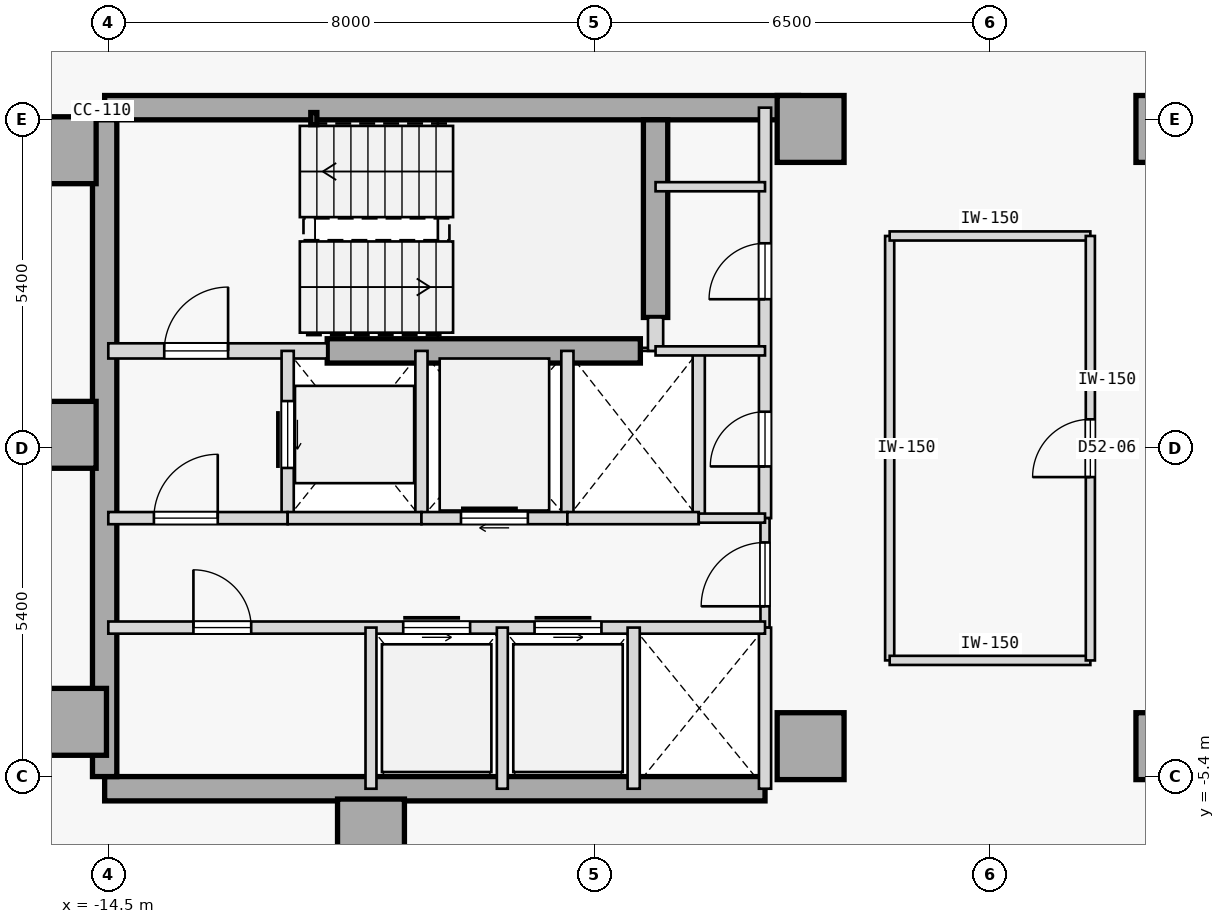
"""IFC4 building model, lengths in metres.
Left out: names, types, materials, properties, quantities, classifications, styles, units other than length and angle.
Written with IfcOpenShell. Run it as: python <this file> out.ifc"""

import sys

from ifc_helpers import new_model, si_unit, direction, frame, frame_2d, origin, origin_2d, place, context, subcontext, project, spatial, rectangle, hollow_rectangle, extrude, element, fill, save


model = new_model("IFC4")
c1 = context("Model", 3, precision=1e-05, world=origin(), true_north=direction((0.0, 1.0)))
c2 = subcontext(c1, "Body", "Model", "MODEL_VIEW")
j1 = project(units=[si_unit("LENGTHUNIT", "METRE"), si_unit("PLANEANGLEUNIT", "RADIAN")], contexts=[c1])
p1 = place(None, origin())
s1 = spatial("IfcSite", under=j1, at=p1, CompositionType="ELEMENT")
p2 = place(p1, origin())
s2 = spatial("IfcBuilding", under=s1, at=p2, CompositionType="ELEMENT")
p3 = place(p2, frame((0.0, 0.0, 199.0)))
s3 = spatial("IfcBuildingStorey", under=s2, at=p3, CompositionType="ELEMENT", Elevation=199.0)
for number, where, z_axis, x_axis in (
    (1, (-15.25, 4.9, 0.0), (0.0, 0.0, 1.0), (1.0, 0.0, 0.0)),
    (2, (-15.25, 0.22, 0.0), (0.0, 0.0, 1.0), (1.0, 0.0, 0.0)),
    (3, (-15.08, -4.5, 0.0), (0.0, 0.0, 1.0), (1.0, 0.0, 0.0)),
    (4, (-10.18, -6.32, 0.0), (0.0, 0.0, 1.0), (1.0, 0.0, 0.0)),
    (5, (-2.95, -4.9, 0.0), (0.0, 0.0, 1.0), (1.0, 0.0, 0.0)),
    (6, (-2.95, 5.25, 0.0), (0.0, 0.0, 1.0), (1.0, 0.0, 0.0)),
    (7, (2.95, -4.9, 0.0), (0.0, 0.0, 1.0), (1.0, 0.0, 0.0)),
    (8, (2.95, 5.25, 0.0), (0.0, 0.0, 1.0), (1.0, 0.0, 0.0)),
):
    element("IfcColumn", number, at=place(p3, frame(where, z_axis=z_axis, x_axis=x_axis)), inside=s3, PredefinedType="COLUMN", context=c2, shape_type="SweptSolid", body=[
        extrude(rectangle(XDim=1.1, YDim=1.1, at=origin_2d()), origin(), (0.0, 0.0, 1.0), 3.4),
    ])
p4 = place(p3, frame((-14.56, 5.6, 0.0), z_axis=(0.0, 0.0, 1.0), x_axis=(1.0, 0.0, 0.0)))
e9 = element("IfcWall", 9, at=p4, inside=s3, PredefinedType="SHEAR", context=c2, shape_type="SweptSolid", body=[
    extrude(rectangle(XDim=11.41, YDim=0.4, at=frame_2d((5.705, 0.0))), origin(), (0.0, 0.0, 1.0), 3.0),
])
p5 = place(p3, frame((-14.56, -5.6, 0.0), z_axis=(0.0, 0.0, 1.0), x_axis=(1.0, 0.0, 0.0)))
e10 = element("IfcWall", 10, at=p5, inside=s3, PredefinedType="SHEAR", context=c2, shape_type="SweptSolid", body=[
    extrude(rectangle(XDim=10.86, YDim=0.4, at=frame_2d((5.43, 0.0))), origin(), (0.0, 0.0, 1.0), 3.0),
])
p6 = place(p3, frame((-14.56, -5.4, 0.0), z_axis=(0.0, 0.0, 1.0), x_axis=(0.0, 1.0, 0.0)))
e11 = element("IfcWall", 11, at=p6, inside=s3, PredefinedType="SHEAR", context=c2, shape_type="SweptSolid", body=[
    extrude(rectangle(XDim=10.8, YDim=0.4, at=frame_2d((5.4, 0.0))), origin(), (0.0, 0.0, 1.0), 3.0),
])
p7 = place(p3, frame((-5.5, 2.15, 0.0), z_axis=(0.0, 0.0, 1.0), x_axis=(0.0, 1.0, 0.0)))
e12 = element("IfcWall", 12, at=p7, inside=s3, PredefinedType="SHEAR", context=c2, shape_type="SweptSolid", body=[
    extrude(rectangle(XDim=3.25, YDim=0.4, at=frame_2d((1.625, 0.0))), origin(), (0.0, 0.0, 1.0), 3.0),
])
p8 = place(p3, frame((-10.9, 1.6, 0.0), z_axis=(0.0, 0.0, 1.0), x_axis=(1.0, 0.0, 0.0)))
e13 = element("IfcWall", 13, at=p8, inside=s3, PredefinedType="SHEAR", context=c2, shape_type="SweptSolid", body=[
    extrude(rectangle(XDim=5.15, YDim=0.4, at=frame_2d((2.575, 0.0))), origin(), (0.0, 0.0, 1.0), 3.0),
])
p9 = place(p3, frame((-11.12, 5.42, 0.0), z_axis=(0.0, 0.0, 1.0), x_axis=(1.0, 0.0, 0.0)))
e14 = element("IfcColumn", 14, at=p9, inside=s3, PredefinedType="COLUMN", context=c2, shape_type="SweptSolid", body=[
    extrude(hollow_rectangle(XDim=0.1, YDim=0.2, WallThickness=0.008, at=origin_2d()), origin(), (0.0, 0.0, 1.0), 3.4),
])
p10 = place(p3, frame((-14.5, 1.6, 0.0), z_axis=(0.0, 0.0, 1.0), x_axis=(1.0, 0.0, 0.0)))
e15 = element("IfcWall", 15, at=p10, inside=s3, PredefinedType="STANDARD", context=c2, shape_type="SweptSolid", body=[
    extrude(rectangle(XDim=3.6, YDim=0.25, at=frame_2d((1.8, 0.0))), origin(), (0.0, 0.0, 1.0), 3.0),
])
p11 = place(p10, frame((0.92, 0.0, 0.0)))
e16 = element("IfcOpeningElement", 16, at=p11, cuts=e15, PredefinedType="OPENING", context=c2, shape_type="SweptSolid", body=[
    extrude(rectangle(XDim=1.05, YDim=2.15, at=frame_2d((0.525, 1.075))), frame((0.0, 0.135, 0.0), z_axis=(0.0, -1.0, 0.0), x_axis=(1.0, 0.0, 0.0)), (0.0, 0.0, 1.0), 0.27),
])
p12 = place(p3, frame((-5.5, 1.6, 0.0), z_axis=(0.0, 0.0, 1.0), x_axis=(0.0, 1.0, 0.0)))
e17 = element("IfcWall", 17, at=p12, inside=s3, PredefinedType="STANDARD", context=c2, shape_type="SweptSolid", body=[
    extrude(rectangle(XDim=0.55, YDim=0.25, at=frame_2d((0.275, 0.0))), origin(), (0.0, 0.0, 1.0), 3.0),
])
p13 = place(p3, frame((-3.7, -1.15, 0.0), z_axis=(0.0, 0.0, 1.0), x_axis=(0.0, 1.0, 0.0)))
e18 = element("IfcWall", 18, at=p13, inside=s3, PredefinedType="STANDARD", context=c2, shape_type="SweptSolid", body=[
    extrude(rectangle(XDim=6.75, YDim=0.2, at=frame_2d((3.375, 0.0))), origin(), (0.0, 0.0, 1.0), 3.0),
])
p14 = place(p13, frame((3.6, 0.0, 0.0)))
e19 = element("IfcOpeningElement", 19, at=p14, cuts=e18, PredefinedType="OPENING", context=c2, shape_type="SweptSolid", body=[
    extrude(rectangle(XDim=0.92, YDim=2.15, at=frame_2d((0.46, 1.075))), frame((0.0, 0.11, 0.0), z_axis=(0.0, -1.0, 0.0), x_axis=(1.0, 0.0, 0.0)), (0.0, 0.0, 1.0), 0.22),
])
p15 = place(p13, frame((0.85, 0.0, 0.0)))
e20 = element("IfcOpeningElement", 20, at=p15, cuts=e18, PredefinedType="OPENING", context=c2, shape_type="SweptSolid", body=[
    extrude(rectangle(XDim=0.9, YDim=2.15, at=frame_2d((0.45, 1.075))), frame((0.0, 0.11, 0.0), z_axis=(0.0, -1.0, 0.0), x_axis=(1.0, 0.0, 0.0)), (0.0, 0.0, 1.0), 0.22),
])
p16 = place(p3, frame((-3.7, -2.95, 0.0), z_axis=(0.0, 0.0, 1.0), x_axis=(0.0, 1.0, 0.0)))
e21 = element("IfcWall", 21, at=p16, inside=s3, PredefinedType="PARTITIONING", context=c2, shape_type="SweptSolid", body=[
    extrude(rectangle(XDim=1.8, YDim=0.15, at=frame_2d((0.9, 0.0))), origin(), (0.0, 0.0, 1.0), 3.0),
])
p17 = place(p16, frame((0.35, 0.0, 0.0)))
e22 = element("IfcOpeningElement", 22, at=p17, cuts=e21, PredefinedType="OPENING", context=c2, shape_type="SweptSolid", body=[
    extrude(rectangle(XDim=1.05, YDim=2.18, at=frame_2d((0.525, 1.09))), frame((0.0, 0.085, 0.0), z_axis=(0.0, -1.0, 0.0), x_axis=(1.0, 0.0, 0.0)), (0.0, 0.0, 1.0), 0.17),
])
p18 = place(p3, frame((-3.7, -5.6, 0.0), z_axis=(0.0, 0.0, 1.0), x_axis=(0.0, 1.0, 0.0)))
e23 = element("IfcWall", 23, at=p18, inside=s3, PredefinedType="STANDARD", context=c2, shape_type="SweptSolid", body=[
    extrude(rectangle(XDim=2.65, YDim=0.2, at=frame_2d((1.325, 0.0))), origin(), (0.0, 0.0, 1.0), 3.0),
])
p19 = place(p3, frame((-11.55, -1.15, 0.0), z_axis=(0.0, 0.0, 1.0), x_axis=(0.0, 1.0, 0.0)))
e24 = element("IfcWall", 24, at=p19, inside=s3, PredefinedType="STANDARD", context=c2, shape_type="SweptSolid", body=[
    extrude(rectangle(XDim=2.75, YDim=0.2, at=frame_2d((1.375, 0.0))), origin(), (0.0, 0.0, 1.0), 3.0),
])
p20 = place(p19, frame((0.825, 0.0, 0.0)))
e25 = element("IfcOpeningElement", 25, at=p20, cuts=e24, PredefinedType="OPENING", context=c2, shape_type="SweptSolid", body=[
    extrude(rectangle(XDim=1.1, YDim=2.15, at=frame_2d((0.55, 1.075))), frame((0.0, 0.11, 0.0), z_axis=(0.0, -1.0, 0.0), x_axis=(1.0, 0.0, 0.0)), (0.0, 0.0, 1.0), 0.22),
])
p21 = place(p3, frame((-9.35, -1.15, 0.0), z_axis=(0.0, 0.0, 1.0), x_axis=(0.0, 1.0, 0.0)))
e26 = element("IfcWall", 26, at=p21, inside=s3, PredefinedType="STANDARD", context=c2, shape_type="SweptSolid", body=[
    extrude(rectangle(XDim=2.75, YDim=0.2, at=frame_2d((1.375, 0.0))), origin(), (0.0, 0.0, 1.0), 3.0),
])
p22 = place(p3, frame((-14.5, -1.15, 0.0), z_axis=(0.0, 0.0, 1.0), x_axis=(1.0, 0.0, 0.0)))
e27 = element("IfcWall", 27, at=p22, inside=s3, PredefinedType="STANDARD", context=c2, shape_type="SweptSolid", body=[
    extrude(rectangle(XDim=2.95, YDim=0.2, at=frame_2d((1.475, 0.0))), origin(), (0.0, 0.0, 1.0), 3.0),
])
p23 = place(p22, frame((0.75, 0.0, 0.0)))
e28 = element("IfcOpeningElement", 28, at=p23, cuts=e27, PredefinedType="OPENING", context=c2, shape_type="SweptSolid", body=[
    extrude(rectangle(XDim=1.05, YDim=2.18, at=frame_2d((0.525, 1.09))), frame((0.0, 0.11, 0.0), z_axis=(0.0, -1.0, 0.0), x_axis=(1.0, 0.0, 0.0)), (0.0, 0.0, 1.0), 0.22),
])
p24 = place(p3, frame((-11.55, -1.15, 0.0), z_axis=(0.0, 0.0, 1.0), x_axis=(1.0, 0.0, 0.0)))
e29 = element("IfcWall", 29, at=p24, inside=s3, PredefinedType="STANDARD", context=c2, shape_type="SweptSolid", body=[
    extrude(rectangle(XDim=2.2, YDim=0.2, at=frame_2d((1.1, 0.0))), origin(), (0.0, 0.0, 1.0), 3.0),
])
p25 = place(p3, frame((-6.95, -1.15, 0.0), z_axis=(0.0, 0.0, 1.0), x_axis=(0.0, 1.0, 0.0)))
e30 = element("IfcWall", 30, at=p25, inside=s3, PredefinedType="STANDARD", context=c2, shape_type="SweptSolid", body=[
    extrude(rectangle(XDim=2.75, YDim=0.2, at=frame_2d((1.375, 0.0))), origin(), (0.0, 0.0, 1.0), 3.0),
])
p26 = place(p3, frame((-9.35, -1.15, 0.0), z_axis=(0.0, 0.0, 1.0), x_axis=(1.0, 0.0, 0.0)))
e31 = element("IfcWall", 31, at=p26, inside=s3, PredefinedType="STANDARD", context=c2, shape_type="SweptSolid", body=[
    extrude(rectangle(XDim=2.4, YDim=0.2, at=frame_2d((1.2, 0.0))), origin(), (0.0, 0.0, 1.0), 3.0),
])
p27 = place(p26, frame((0.65, 0.0, 0.0)))
e32 = element("IfcOpeningElement", 32, at=p27, cuts=e31, PredefinedType="OPENING", context=c2, shape_type="SweptSolid", body=[
    extrude(rectangle(XDim=1.1, YDim=2.15, at=frame_2d((0.55, 1.075))), frame((0.0, 0.11, 0.0), z_axis=(0.0, -1.0, 0.0), x_axis=(1.0, 0.0, 0.0)), (0.0, 0.0, 1.0), 0.22),
])
p28 = place(p3, frame((-4.79, -1.15, 0.0), z_axis=(0.0, 0.0, 1.0), x_axis=(0.0, 1.0, 0.0)))
e33 = element("IfcWall", 33, at=p28, inside=s3, PredefinedType="STANDARD", context=c2, shape_type="SweptSolid", body=[
    extrude(rectangle(XDim=2.75, YDim=0.2, at=frame_2d((1.375, 0.0))), origin(), (0.0, 0.0, 1.0), 3.0),
])
p29 = place(p3, frame((-6.95, -1.15, 0.0), z_axis=(0.0, 0.0, 1.0), x_axis=(1.0, 0.0, 0.0)))
e34 = element("IfcWall", 34, at=p29, inside=s3, PredefinedType="STANDARD", context=c2, shape_type="SweptSolid", body=[
    extrude(rectangle(XDim=2.16, YDim=0.2, at=frame_2d((1.08, 0.0))), origin(), (0.0, 0.0, 1.0), 3.0),
])
p30 = place(p3, frame((-4.79, -1.15, 0.0), z_axis=(0.0, 0.0, 1.0), x_axis=(1.0, 0.0, 0.0)))
e35 = element("IfcWall", 35, at=p30, inside=s3, PredefinedType="PARTITIONING", context=c2, shape_type="SweptSolid", body=[
    extrude(rectangle(XDim=1.09, YDim=0.15, at=frame_2d((0.545, 0.0))), origin(), (0.0, 0.0, 1.0), 3.0),
])
p31 = place(p3, frame((-14.5, -2.95, 0.0), z_axis=(0.0, 0.0, 1.0), x_axis=(1.0, 0.0, 0.0)))
e36 = element("IfcWall", 36, at=p31, inside=s3, PredefinedType="STANDARD", context=c2, shape_type="SweptSolid", body=[
    extrude(rectangle(XDim=10.8, YDim=0.2, at=frame_2d((5.4, 0.0))), origin(), (0.0, 0.0, 1.0), 3.0),
])
p32 = place(p31, frame((4.85, 0.0, 0.0)))
e37 = element("IfcOpeningElement", 37, at=p32, cuts=e36, PredefinedType="OPENING", context=c2, shape_type="SweptSolid", body=[
    extrude(rectangle(XDim=1.1, YDim=2.15, at=frame_2d((0.55, 1.075))), frame((0.0, 0.11, 0.0), z_axis=(0.0, -1.0, 0.0), x_axis=(1.0, 0.0, 0.0)), (0.0, 0.0, 1.0), 0.22),
])
p33 = place(p31, frame((7.01, 0.0, 0.0)))
e38 = element("IfcOpeningElement", 38, at=p33, cuts=e36, PredefinedType="OPENING", context=c2, shape_type="SweptSolid", body=[
    extrude(rectangle(XDim=1.1, YDim=2.15, at=frame_2d((0.55, 1.075))), frame((0.0, 0.11, 0.0), z_axis=(0.0, -1.0, 0.0), x_axis=(1.0, 0.0, 0.0)), (0.0, 0.0, 1.0), 0.22),
])
p34 = place(p31, frame((1.4, 0.0, 0.0)))
e39 = element("IfcOpeningElement", 39, at=p34, cuts=e36, PredefinedType="OPENING", context=c2, shape_type="SweptSolid", body=[
    extrude(rectangle(XDim=0.95, YDim=2.15, at=frame_2d((0.475, 1.075))), frame((0.0, 0.11, 0.0), z_axis=(0.0, -1.0, 0.0), x_axis=(1.0, 0.0, 0.0)), (0.0, 0.0, 1.0), 0.22),
])
p35 = place(p3, frame((-5.86, -5.6, 0.0), z_axis=(0.0, 0.0, 1.0), x_axis=(0.0, 1.0, 0.0)))
e40 = element("IfcWall", 40, at=p35, inside=s3, PredefinedType="STANDARD", context=c2, shape_type="SweptSolid", body=[
    extrude(rectangle(XDim=2.65, YDim=0.2, at=frame_2d((1.325, 0.0))), origin(), (0.0, 0.0, 1.0), 3.0),
])
for number, where, z_axis, x_axis in (
    (41, (-10.18, -5.6, 0.0), (0.0, 0.0, 1.0), (0.0, 1.0, 0.0)),
    (42, (-8.02, -5.6, 0.0), (0.0, 0.0, 1.0), (0.0, 1.0, 0.0)),
):
    element("IfcWall", number, at=place(p3, frame(where, z_axis=z_axis, x_axis=x_axis)), inside=s3, PredefinedType="STANDARD", context=c2, shape_type="SweptSolid", body=[
        extrude(rectangle(XDim=2.65, YDim=0.18, at=frame_2d((1.325, 0.0))), origin(), (0.0, 0.0, 1.0), 3.0),
    ])
for number, where, z_axis, x_axis in (
    (43, (-5.5, 4.3, 0.0), (0.0, 0.0, 1.0), (1.0, 0.0, 0.0)),
    (44, (-5.5, 1.6, 0.0), (0.0, 0.0, 1.0), (1.0, 0.0, 0.0)),
):
    element("IfcWall", number, at=place(p3, frame(where, z_axis=z_axis, x_axis=x_axis)), inside=s3, PredefinedType="PARTITIONING", context=c2, shape_type="SweptSolid", body=[
        extrude(rectangle(XDim=1.8, YDim=0.15, at=frame_2d((0.9, 0.0))), origin(), (0.0, 0.0, 1.0), 3.0),
    ])
p36 = place(p3, frame((-1.65, -3.49, 0.0), z_axis=(0.0, 0.0, 1.0), x_axis=(-3.4979712e-05, 0.999999999388, 0.0)))
e45 = element("IfcWall", 45, at=p36, inside=s3, PredefinedType="PARTITIONING", context=c2, shape_type="SweptSolid", body=[
    extrude(rectangle(XDim=6.979, YDim=0.15, at=frame_2d((3.49, 0.0))), origin(), (0.0, 0.0, 1.0), 3.0),
])
p37 = place(p3, frame((-1.65, -3.49, 0.0), z_axis=(0.0, 0.0, 1.0), x_axis=(0.999999975374, -0.000221926315, 0.0)))
e46 = element("IfcWall", 46, at=p37, inside=s3, PredefinedType="PARTITIONING", context=c2, shape_type="SweptSolid", body=[
    extrude(rectangle(XDim=3.3, YDim=0.15, at=frame_2d((1.65, 0.0))), origin(), (0.0, 0.0, 1.0), 3.0),
])
p38 = place(p3, frame((-1.65, 3.49, 0.0), z_axis=(0.0, 0.0, 1.0), x_axis=(1.0, 0.0, 0.0)))
e47 = element("IfcWall", 47, at=p38, inside=s3, PredefinedType="PARTITIONING", context=c2, shape_type="SweptSolid", body=[
    extrude(rectangle(XDim=3.3, YDim=0.15, at=frame_2d((1.65, 0.0))), origin(), (0.0, 0.0, 1.0), 3.0),
])
p39 = place(p3, frame((1.65, -3.49, 0.0), z_axis=(0.0, 0.0, 1.0), x_axis=(-6.9952083e-05, 0.999999997553, 0.0)))
e48 = element("IfcWall", 48, at=p39, inside=s3, PredefinedType="PARTITIONING", context=c2, shape_type="SweptSolid", body=[
    extrude(rectangle(XDim=6.98, YDim=0.15, at=frame_2d((3.49, 0.0))), origin(), (0.0, 0.0, 1.0), 3.0),
])
p40 = place(p39, frame((3.015, 0.0, 0.0)))
e49 = element("IfcOpeningElement", 49, at=p40, cuts=e48, PredefinedType="OPENING", context=c2, shape_type="SweptSolid", body=[
    extrude(rectangle(XDim=0.95, YDim=2.15, at=frame_2d((0.475, 1.075))), frame((0.0, 0.085, 0.0), z_axis=(0.0, -1.0, 0.0), x_axis=(1.0, 0.0, 0.0)), (0.0, 0.0, 1.0), 0.17),
])
p41 = place(p11, origin())
e50 = element("IfcDoor", 50, at=p41, inside=s3, OperationType="SINGLE_SWING_RIGHT", PredefinedType="DOOR", context=c2, shape_type="SweptSolid", body=[
    extrude(rectangle(XDim=1.05, YDim=2.15, at=frame_2d((0.525, 1.075))), frame((0.0, 0.025, 0.0), z_axis=(0.0, -1.0, 0.0), x_axis=(1.0, 0.0, 0.0)), (0.0, 0.0, 1.0), 0.05),
])
fill(e16, e50)
p42 = place(p23, origin())
e51 = element("IfcDoor", 51, at=p42, inside=s3, OperationType="SINGLE_SWING_RIGHT", PredefinedType="DOOR", context=c2, shape_type="SweptSolid", body=[
    extrude(rectangle(XDim=1.05, YDim=2.18, at=frame_2d((0.525, 1.09))), frame((0.0, 0.025, 0.0), z_axis=(0.0, -1.0, 0.0), x_axis=(1.0, 0.0, 0.0)), (0.0, 0.0, 1.0), 0.05),
])
fill(e28, e51)
p43 = place(p17, origin())
e52 = element("IfcDoor", 52, at=p43, inside=s3, OperationType="SINGLE_SWING_LEFT", PredefinedType="DOOR", context=c2, shape_type="SweptSolid", body=[
    extrude(rectangle(XDim=1.05, YDim=2.18, at=frame_2d((0.525, 1.09))), frame((0.0, 0.025, 0.0), z_axis=(0.0, -1.0, 0.0), x_axis=(1.0, 0.0, 0.0)), (0.0, 0.0, 1.0), 0.05),
])
fill(e22, e52)
p44 = place(p20, origin())
e53 = element("IfcDoor", 53, at=p44, inside=s3, OperationType="SLIDING_TO_RIGHT", PredefinedType="DOOR", context=c2, shape_type="SweptSolid", body=[
    extrude(rectangle(XDim=1.1, YDim=2.15, at=frame_2d((0.55, 1.075))), frame((0.0, 0.025, 0.0), z_axis=(0.0, -1.0, 0.0), x_axis=(1.0, 0.0, 0.0)), (0.0, 0.0, 1.0), 0.05),
])
fill(e25, e53)
p45 = place(p27, origin())
e54 = element("IfcDoor", 54, at=p45, inside=s3, OperationType="SLIDING_TO_RIGHT", PredefinedType="DOOR", context=c2, shape_type="SweptSolid", body=[
    extrude(rectangle(XDim=1.1, YDim=2.15, at=frame_2d((0.55, 1.075))), frame((0.0, 0.025, 0.0), z_axis=(0.0, -1.0, 0.0), x_axis=(1.0, 0.0, 0.0)), (0.0, 0.0, 1.0), 0.05),
])
fill(e32, e54)
p46 = place(p32, origin())
e55 = element("IfcDoor", 55, at=p46, inside=s3, OperationType="SLIDING_TO_LEFT", PredefinedType="DOOR", context=c2, shape_type="SweptSolid", body=[
    extrude(rectangle(XDim=1.1, YDim=2.15, at=frame_2d((0.55, 1.075))), frame((0.0, 0.025, 0.0), z_axis=(0.0, -1.0, 0.0), x_axis=(1.0, 0.0, 0.0)), (0.0, 0.0, 1.0), 0.05),
])
fill(e37, e55)
p47 = place(p33, origin())
e56 = element("IfcDoor", 56, at=p47, inside=s3, OperationType="SLIDING_TO_LEFT", PredefinedType="DOOR", context=c2, shape_type="SweptSolid", body=[
    extrude(rectangle(XDim=1.1, YDim=2.15, at=frame_2d((0.55, 1.075))), frame((0.0, 0.025, 0.0), z_axis=(0.0, -1.0, 0.0), x_axis=(1.0, 0.0, 0.0)), (0.0, 0.0, 1.0), 0.05),
])
fill(e38, e56)
p48 = place(p34, origin())
e57 = element("IfcDoor", 57, at=p48, inside=s3, OperationType="SINGLE_SWING_LEFT", PredefinedType="DOOR", context=c2, shape_type="SweptSolid", body=[
    extrude(rectangle(XDim=0.95, YDim=2.15, at=frame_2d((0.475, 1.075))), frame((0.0, 0.025, 0.0), z_axis=(0.0, -1.0, 0.0), x_axis=(1.0, 0.0, 0.0)), (0.0, 0.0, 1.0), 0.05),
])
fill(e39, e57)
p49 = place(p14, origin())
e58 = element("IfcDoor", 58, at=p49, inside=s3, OperationType="SINGLE_SWING_LEFT", PredefinedType="DOOR", context=c2, shape_type="SweptSolid", body=[
    extrude(rectangle(XDim=0.92, YDim=2.15, at=frame_2d((0.46, 1.075))), frame((0.0, 0.025, 0.0), z_axis=(0.0, -1.0, 0.0), x_axis=(1.0, 0.0, 0.0)), (0.0, 0.0, 1.0), 0.05),
])
fill(e19, e58)
p50 = place(p15, origin())
e59 = element("IfcDoor", 59, at=p50, inside=s3, OperationType="SINGLE_SWING_LEFT", PredefinedType="DOOR", context=c2, shape_type="SweptSolid", body=[
    extrude(rectangle(XDim=0.9, YDim=2.15, at=frame_2d((0.45, 1.075))), frame((0.0, 0.025, 0.0), z_axis=(0.0, -1.0, 0.0), x_axis=(1.0, 0.0, 0.0)), (0.0, 0.0, 1.0), 0.05),
])
fill(e20, e59)
p51 = place(p40, origin())
e60 = element("IfcDoor", 60, at=p51, inside=s3, OperationType="SINGLE_SWING_LEFT", PredefinedType="DOOR", context=c2, shape_type="SweptSolid", body=[
    extrude(rectangle(XDim=0.95, YDim=2.15, at=frame_2d((0.475, 1.075))), frame((0.0, 0.025, 0.0), z_axis=(0.0, -1.0, 0.0), x_axis=(1.0, 0.0, 0.0)), (0.0, 0.0, 1.0), 0.05),
])
fill(e49, e60)
save(model, sys.argv[1])
